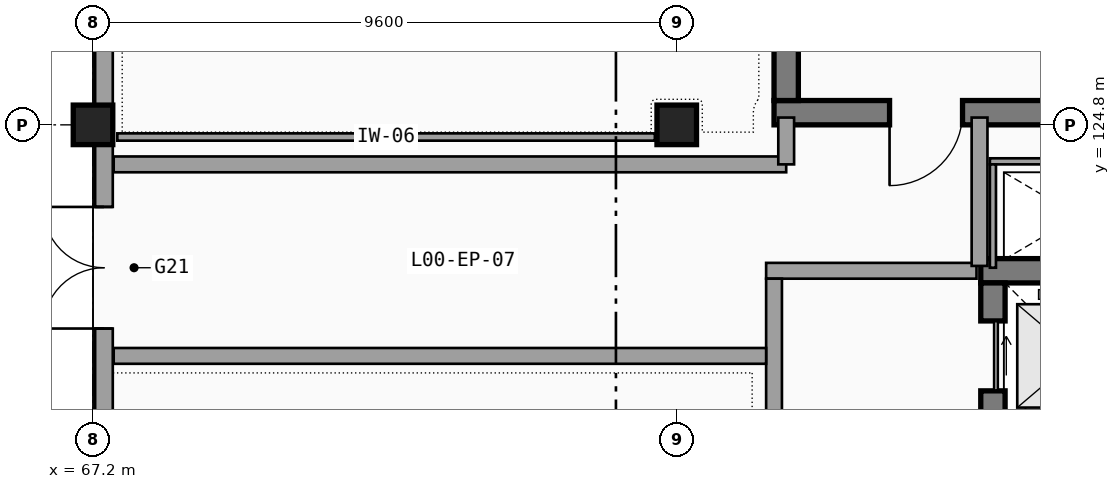
"""IFC4 building model, lengths in metres.
Left out: names, types, materials, properties, quantities, classifications, styles, units other than length and angle.
Written with IfcOpenShell. Run it as: python <this file> out.ifc"""

import sys

from ifc_helpers import new_model, si_unit, direction, frame, frame_2d, origin, origin_2d, place, context, subcontext, project, spatial, rectangle, extrude, element, fill, save


model = new_model("IFC4")
c1 = context("Model", 3, precision=1e-05, world=origin(), true_north=direction((0.0, 1.0)))
c2 = subcontext(c1, "Body", "Model", "MODEL_VIEW")
j1 = project(units=[si_unit("LENGTHUNIT", "METRE"), si_unit("PLANEANGLEUNIT", "RADIAN")], contexts=[c1])
p1 = place(None, origin())
s1 = spatial("IfcSite", under=j1, at=p1, CompositionType="ELEMENT")
p2 = place(p1, origin())
s2 = spatial("IfcBuilding", under=s1, at=p2, CompositionType="ELEMENT")
p3 = place(p2, origin())
s3 = spatial("IfcBuildingStorey", under=s2, at=p3, CompositionType="ELEMENT", Elevation=0.0)
for number, where, z_axis, x_axis in (
    (1, (67.2, 124.8, 0.0), (0.0, 0.0, 1.0), (1.0, 0.0, 0.0)),
    (2, (76.8, 124.8, 0.0), (0.0, 0.0, 1.0), (1.0, 0.0, 0.0)),
):
    element("IfcColumn", number, at=place(p3, frame(where, z_axis=z_axis, x_axis=x_axis)), inside=s3, PredefinedType="COLUMN", context=c2, shape_type="SweptSolid", body=[
        extrude(rectangle(XDim=0.65, YDim=0.65, at=origin_2d()), origin(), (0.0, 0.0, 1.0), 4.8),
    ])
p4 = place(p3, frame((67.38, 134.4, 0.0), z_axis=(0.0, 0.0, 1.0), x_axis=(0.0, -1.0, 0.0)))
e3 = element("IfcWall", 3, at=p4, inside=s3, PredefinedType="SOLIDWALL", context=c2, shape_type="SweptSolid", body=[
    extrude(rectangle(XDim=9.6, YDim=0.29, at=frame_2d((4.8, 0.0))), origin(), (0.0, 0.0, 1.0), 3.7),
])
p5 = place(p4, frame((4.067, 0.0, 1.0), z_axis=(0.0, 0.0, 1.0), x_axis=(-1.0, 0.0, 0.0)))
e4 = element("IfcOpeningElement", 4, at=p5, cuts=e3, PredefinedType="OPENING", context=c2, shape_type="SweptSolid", body=[
    extrude(rectangle(XDim=2.6, YDim=2.0, at=frame_2d((1.3, 1.0))), frame((0.0, 0.155, 0.0), z_axis=(0.0, -1.0, 0.0), x_axis=(1.0, 0.0, 0.0)), (0.0, 0.0, 1.0), 0.31),
])
p6 = place(p4, frame((8.133, 0.0, 1.0), z_axis=(0.0, 0.0, 1.0), x_axis=(-1.0, 0.0, 0.0)))
e5 = element("IfcOpeningElement", 5, at=p6, cuts=e3, PredefinedType="OPENING", context=c2, shape_type="SweptSolid", body=[
    extrude(rectangle(XDim=2.6, YDim=2.0, at=frame_2d((1.3, 1.0))), frame((0.0, 0.155, 0.0), z_axis=(0.0, -1.0, 0.0), x_axis=(1.0, 0.0, 0.0)), (0.0, 0.0, 1.0), 0.31),
])
p7 = place(p3, frame((67.38, 124.8, 0.0), z_axis=(0.0, 0.0, 1.0), x_axis=(0.0, -1.0, 0.0)))
e6 = element("IfcWall", 6, at=p7, inside=s3, PredefinedType="SOLIDWALL", context=c2, shape_type="SweptSolid", body=[
    extrude(rectangle(XDim=9.6, YDim=0.29, at=frame_2d((4.8, 0.0))), origin(), (0.0, 0.0, 1.0), 3.7),
])
p8 = place(p7, frame((3.35, 0.0, 0.0), z_axis=(0.0, 0.0, 1.0), x_axis=(-1.0, 0.0, 0.0)))
e7 = element("IfcOpeningElement", 7, at=p8, cuts=e6, PredefinedType="OPENING", context=c2, shape_type="SweptSolid", body=[
    extrude(rectangle(XDim=2.0, YDim=2.4, at=frame_2d((1.0, 1.2))), frame((0.0, 0.155, 0.0), z_axis=(0.0, -1.0, 0.0), x_axis=(1.0, 0.0, 0.0)), (0.0, 0.0, 1.0), 0.31),
])
p9 = place(p3, frame((78.4, 125.0, 0.0), z_axis=(0.0, 0.0, 1.0), x_axis=(1.0, 0.0, 0.0)))
e8 = element("IfcWall", 8, at=p9, inside=s3, PredefinedType="SHEAR", context=c2, shape_type="SweptSolid", body=[
    extrude(rectangle(XDim=5.0, YDim=0.4, at=frame_2d((2.5, 0.0))), origin(), (0.0, 0.0, 1.0), 4.5),
])
p10 = place(p9, frame((3.1, 0.0, 0.0), z_axis=(0.0, 0.0, 1.0), x_axis=(-1.0, 0.0, 0.0)))
e9 = element("IfcOpeningElement", 9, at=p10, cuts=e8, PredefinedType="OPENING", context=c2, shape_type="SweptSolid", body=[
    extrude(rectangle(XDim=1.2, YDim=2.2, at=frame_2d((0.6, 1.1))), frame((0.0, 0.21, 0.0), z_axis=(0.0, -1.0, 0.0), x_axis=(1.0, 0.0, 0.0)), (0.0, 0.0, 1.0), 0.42),
])
p11 = place(p3, frame((78.6, 133.35, 0.0), z_axis=(0.0, 0.0, 1.0), x_axis=(0.0, -1.0, 0.0)))
e10 = element("IfcWall", 10, at=p11, inside=s3, PredefinedType="SHEAR", context=c2, shape_type="SweptSolid", body=[
    extrude(rectangle(XDim=8.15, YDim=0.4, at=frame_2d((4.075, 0.0))), origin(), (0.0, 0.0, 1.0), 4.5),
])
p12 = place(p3, frame((85.0, 122.4, 0.0), z_axis=(0.0, 0.0, 1.0), x_axis=(-1.0, 0.0, 0.0)))
e11 = element("IfcWall", 11, at=p12, inside=s3, PredefinedType="SHEAR", context=c2, shape_type="SweptSolid", body=[
    extrude(rectangle(XDim=3.2, YDim=0.4, at=frame_2d((1.6, 0.0))), origin(), (0.0, 0.0, 1.0), 4.5),
])
p13 = place(p3, frame((82.0, 122.2, 0.0), z_axis=(0.0, 0.0, 1.0), x_axis=(0.0, -1.0, 0.0)))
e12 = element("IfcWall", 12, at=p13, inside=s3, PredefinedType="SHEAR", context=c2, shape_type="SweptSolid", body=[
    extrude(rectangle(XDim=2.4, YDim=0.4, at=frame_2d((1.2, 0.0))), origin(), (0.0, 0.0, 1.0), 4.5),
])
p14 = place(p13, frame((0.625, 0.0, 0.0), z_axis=(0.0, 0.0, 1.0), x_axis=(1.0, 0.0, 0.0)))
e13 = element("IfcOpeningElement", 13, at=p14, cuts=e12, PredefinedType="OPENING", context=c2, shape_type="SweptSolid", body=[
    extrude(rectangle(XDim=1.15, YDim=2.2, at=frame_2d((0.575, 1.1))), frame((0.0, 0.21, 0.0), z_axis=(0.0, -1.0, 0.0), x_axis=(1.0, 0.0, 0.0)), (0.0, 0.0, 1.0), 0.42),
])
p15 = place(p3, frame((84.85, 124.2, 0.0), z_axis=(0.0, 0.0, 1.0), x_axis=(-1.0, 0.0, 0.0)))
e14 = element("IfcWall", 14, at=p15, inside=s3, PredefinedType="PARTITIONING", context=c2, shape_type="SweptSolid", body=[
    extrude(rectangle(XDim=2.9, YDim=0.1, at=frame_2d((1.45, 0.0))), origin(), (0.0, 0.0, 1.0), 4.5),
])
p16 = place(p3, frame((82.0, 124.15, 0.0), z_axis=(0.0, 0.0, 1.0), x_axis=(0.0, -1.0, 0.0)))
e15 = element("IfcWall", 15, at=p16, inside=s3, PredefinedType="PARTITIONING", context=c2, shape_type="SweptSolid", body=[
    extrude(rectangle(XDim=1.7, YDim=0.1, at=frame_2d((0.85, 0.0))), origin(), (0.0, 0.0, 1.0), 4.5),
])
p17 = place(p3, frame((81.73, 122.4, 0.0), z_axis=(0.0, 0.0, 1.0), x_axis=(-1.0, 0.0, 0.0)))
e16 = element("IfcWall", 16, at=p17, inside=s3, PredefinedType="SOLIDWALL", context=c2, shape_type="SweptSolid", body=[
    extrude(rectangle(XDim=3.46, YDim=0.26, at=frame_2d((1.73, 0.0))), origin(), (0.0, 0.0, 1.0), 4.5),
])
p18 = place(p3, frame((78.4, 122.27, 0.0), z_axis=(0.0, 0.0, 1.0), x_axis=(0.0, -1.0, 0.0)))
e17 = element("IfcWall", 17, at=p18, inside=s3, PredefinedType="SOLIDWALL", context=c2, shape_type="SweptSolid", body=[
    extrude(rectangle(XDim=5.34, YDim=0.26, at=frame_2d((2.67, 0.0))), origin(), (0.0, 0.0, 1.0), 4.5),
])
p19 = place(p3, frame((67.54, 121.0, 0.0), z_axis=(0.0, 0.0, 1.0), x_axis=(1.0, 0.0, 0.0)))
e18 = element("IfcWall", 18, at=p19, inside=s3, PredefinedType="SOLIDWALL", context=c2, shape_type="SweptSolid", body=[
    extrude(rectangle(XDim=10.73, YDim=0.26, at=frame_2d((5.365, 0.0))), origin(), (0.0, 0.0, 1.0), 3.7),
])
p20 = place(p3, frame((67.54, 124.15, 0.0), z_axis=(0.0, 0.0, 1.0), x_axis=(1.0, 0.0, 0.0)))
e19 = element("IfcWall", 19, at=p20, inside=s3, PredefinedType="SOLIDWALL", context=c2, shape_type="SweptSolid", body=[
    extrude(rectangle(XDim=11.06, YDim=0.26, at=frame_2d((5.53, 0.0))), origin(), (0.0, 0.0, 1.0), 3.7),
])
p21 = place(p3, frame((78.6, 124.15, 0.0), z_axis=(0.0, 0.0, 1.0), x_axis=(0.0, 1.0, 0.0)))
e20 = element("IfcWall", 20, at=p21, inside=s3, PredefinedType="SOLIDWALL", context=c2, shape_type="SweptSolid", body=[
    extrude(rectangle(XDim=0.77, YDim=0.26, at=frame_2d((0.385, 0.0))), origin(), (0.0, 0.0, 1.0), 3.664),
])
p22 = place(p3, frame((81.78, 122.48, 0.0), z_axis=(0.0, 0.0, 1.0), x_axis=(0.0, 1.0, 0.0)))
e21 = element("IfcWall", 21, at=p22, inside=s3, PredefinedType="SOLIDWALL", context=c2, shape_type="SweptSolid", body=[
    extrude(rectangle(XDim=2.44, YDim=0.26, at=frame_2d((1.22, 0.0))), origin(), (0.0, 0.0, 1.0), 3.664),
])
p23 = place(p3, frame((76.44, 124.6, 0.0), z_axis=(0.0, 0.0, 1.0), x_axis=(-1.0, 0.0, 0.0)))
e22 = element("IfcWall", 22, at=p23, inside=s3, PredefinedType="PARTITIONING", context=c2, shape_type="SweptSolid", body=[
    extrude(rectangle(XDim=8.84, YDim=0.12, at=frame_2d((4.42, 0.0))), origin(), (0.0, 0.0, 1.0), 3.664),
])
p24 = place(p8, origin())
e23 = element("IfcDoor", 23, at=p24, inside=s3, OperationType="DOUBLE_DOOR_SINGLE_SWING", PredefinedType="DOOR", context=c2, shape_type="SweptSolid", body=[
    extrude(rectangle(XDim=2.0, YDim=2.4, at=frame_2d((1.0, 1.2))), frame((0.0, 0.025, 0.0), z_axis=(0.0, -1.0, 0.0), x_axis=(1.0, 0.0, 0.0)), (0.0, 0.0, 1.0), 0.05),
])
fill(e7, e23)
p25 = place(p10, origin())
e24 = element("IfcDoor", 24, at=p25, inside=s3, OperationType="SINGLE_SWING_RIGHT", PredefinedType="DOOR", context=c2, shape_type="SweptSolid", body=[
    extrude(rectangle(XDim=1.2, YDim=2.2, at=frame_2d((0.6, 1.1))), frame((0.0, 0.025, 0.0), z_axis=(0.0, -1.0, 0.0), x_axis=(1.0, 0.0, 0.0)), (0.0, 0.0, 1.0), 0.05),
])
fill(e9, e24)
p26 = place(p14, origin())
e25 = element("IfcDoor", 25, at=p26, inside=s3, OperationType="SLIDING_TO_LEFT", PredefinedType="DOOR", context=c2, shape_type="SweptSolid", body=[
    extrude(rectangle(XDim=1.15, YDim=2.2, at=frame_2d((0.575, 1.1))), frame((0.0, 0.025, 0.0), z_axis=(0.0, -1.0, 0.0), x_axis=(1.0, 0.0, 0.0)), (0.0, 0.0, 1.0), 0.05),
])
fill(e13, e25)
save(model, sys.argv[1])
